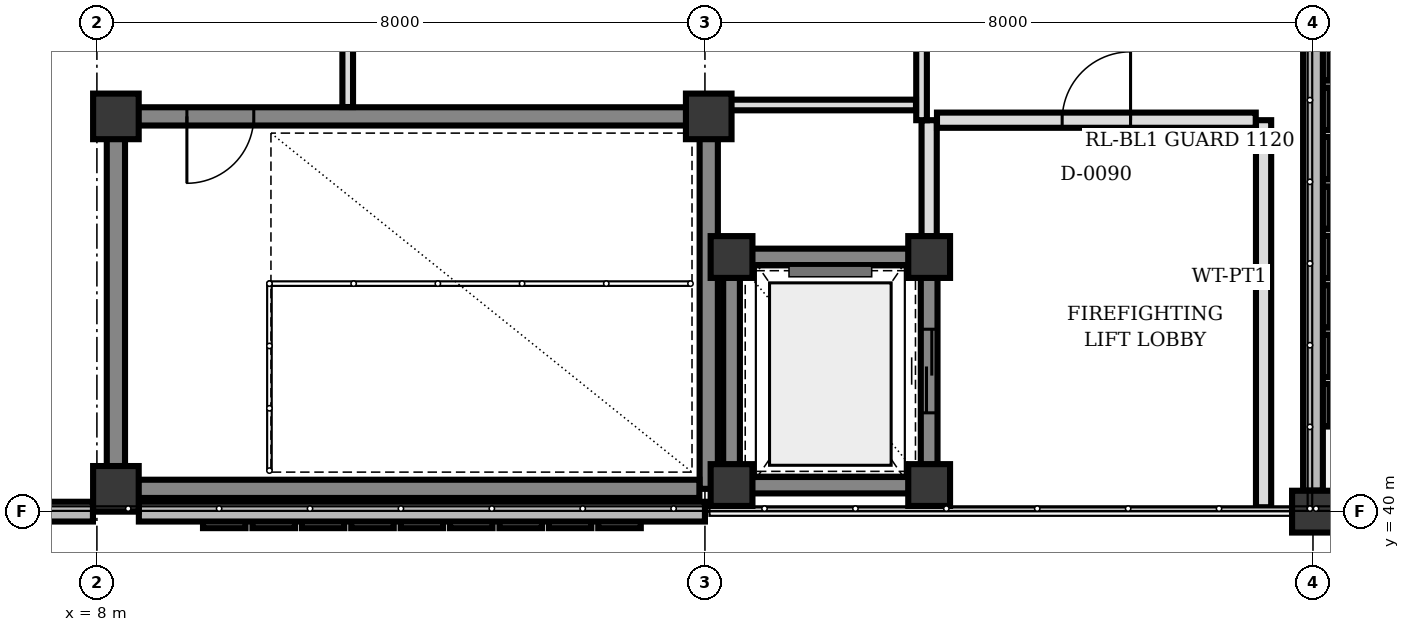
"""IFC4 building model, lengths in metres.
Left out: names, types, materials, properties, quantities, classifications, styles, units other than length and angle.
Written with IfcOpenShell. Run it as: python <this file> out.ifc"""

import sys

from ifc_helpers import new_model, si_unit, direction, frame, frame_2d, origin, origin_2d, place, context, subcontext, project, spatial, rectangle, extrude, element, fill, save


model = new_model("IFC4")
c1 = context("Model", 3, precision=1e-05, world=origin(), true_north=direction((0.0, 1.0)))
c2 = subcontext(c1, "Body", "Model", "MODEL_VIEW")
j1 = project(units=[si_unit("LENGTHUNIT", "METRE"), si_unit("PLANEANGLEUNIT", "RADIAN")], contexts=[c1])
p1 = place(None, origin())
s1 = spatial("IfcSite", under=j1, at=p1, CompositionType="ELEMENT")
p2 = place(p1, origin())
s2 = spatial("IfcBuilding", under=s1, at=p2, CompositionType="ELEMENT")
p3 = place(p2, frame((0.0, 0.0, 20.5)))
s3 = spatial("IfcBuildingStorey", under=s2, at=p3, CompositionType="ELEMENT", Elevation=20.5)
for number, where, z_axis, x_axis in (
    (1, (8.25, 40.3, 0.0), (0.0, 0.0, 1.0), (1.0, 0.0, 0.0)),
    (2, (16.05, 45.2, 0.0), (0.0, 0.0, 1.0), (1.0, 0.0, 0.0)),
    (3, (8.25, 45.2, 0.0), (0.0, 0.0, 1.0), (1.0, 0.0, 0.0)),
):
    element("IfcColumn", number, at=place(p3, frame(where, z_axis=z_axis, x_axis=x_axis)), inside=s3, PredefinedType="COLUMN", context=c2, shape_type="SweptSolid", body=[
        extrude(rectangle(XDim=0.6, YDim=0.6, at=origin_2d()), origin(), (0.0, 0.0, 1.0), 4.0),
    ])
for number, where, z_axis, x_axis in (
    (4, (16.35, 40.35, 0.0), (0.0, 0.0, 1.0), (1.0, 0.0, 0.0)),
    (5, (18.95, 40.35, 0.0), (0.0, 0.0, 1.0), (1.0, 0.0, 0.0)),
    (6, (18.95, 43.35, 0.0), (0.0, 0.0, 1.0), (1.0, 0.0, 0.0)),
    (7, (16.35, 43.35, 0.0), (0.0, 0.0, 1.0), (1.0, 0.0, 0.0)),
    (8, (24.0, 40.0, 0.0), (0.0, 0.0, 1.0), (1.0, 0.0, 0.0)),
):
    element("IfcColumn", number, at=place(p3, frame(where, z_axis=z_axis, x_axis=x_axis)), inside=s3, PredefinedType="COLUMN", context=c2, shape_type="SweptSolid", body=[
        extrude(rectangle(XDim=0.55, YDim=0.55, at=origin_2d()), origin(), (0.0, 0.0, 1.0), 4.0),
    ])
p4 = place(p3, frame((24.0, 47.723, 0.0), z_axis=(0.0, 0.0, 1.0), x_axis=(0.0, -1.0, 0.0)))
e9 = element("IfcWall", 9, at=p4, inside=s3, PredefinedType="SOLIDWALL", context=c2, shape_type="SweptSolid", body=[
    extrude(rectangle(XDim=7.446, YDim=0.26, at=frame_2d((3.723, 0.0))), origin(), (0.0, 0.0, 1.0), 3.397),
])
p5 = place(p3, frame((16.0, 40.0, 0.0), z_axis=(0.0, 0.0, 1.0), x_axis=(-1.0, 0.0, 0.0)))
e10 = element("IfcWall", 10, at=p5, inside=s3, PredefinedType="SOLIDWALL", context=c2, shape_type="SweptSolid", body=[
    extrude(rectangle(XDim=7.448, YDim=0.26, at=frame_2d((3.724, 0.0))), origin(), (0.0, 0.0, 1.0), 3.55),
])
p6 = place(p3, frame((7.948, 40.0, 0.0), z_axis=(0.0, 0.0, 1.0), x_axis=(-1.0, 0.0, 0.0)))
e11 = element("IfcWall", 11, at=p6, inside=s3, PredefinedType="SOLIDWALL", context=c2, shape_type="SweptSolid", body=[
    extrude(rectangle(XDim=7.671, YDim=0.26, at=frame_2d((3.835, 0.0))), origin(), (0.0, 0.0, 1.0), 3.55),
])
p7 = place(p6, frame((1.476, 0.0, 0.9)))
e12 = element("IfcOpeningElement", 12, at=p7, cuts=e11, PredefinedType="OPENING", context=c2, shape_type="SweptSolid", body=[
    extrude(rectangle(XDim=1.65, YDim=1.4, at=frame_2d((0.825, 0.7))), frame((0.0, 0.14, 0.0), z_axis=(0.0, -1.0, 0.0), x_axis=(1.0, 0.0, 0.0)), (0.0, 0.0, 1.0), 0.28),
])
p8 = place(p3, frame((8.25, 40.592, 0.0), z_axis=(0.0, 0.0, 1.0), x_axis=(0.0, 1.0, 0.0)))
e13 = element("IfcWall", 13, at=p8, inside=s3, PredefinedType="SHEAR", context=c2, shape_type="SweptSolid", body=[
    extrude(rectangle(XDim=4.316, YDim=0.24, at=frame_2d((2.158, 0.0))), origin(), (0.0, 0.0, 1.0), 3.74),
])
p9 = place(p3, frame((16.05, 44.908, 0.0), z_axis=(0.0, 0.0, 1.0), x_axis=(0.0, -1.0, 0.0)))
e14 = element("IfcWall", 14, at=p9, inside=s3, PredefinedType="SHEAR", context=c2, shape_type="SweptSolid", body=[
    extrude(rectangle(XDim=4.608, YDim=0.24, at=frame_2d((2.304, 0.0))), origin(), (0.0, 0.0, 1.0), 3.74),
])
p10 = place(p3, frame((15.927, 40.3, 0.0), z_axis=(0.0, 0.0, 1.0), x_axis=(-1.0, 0.0, 0.0)))
e15 = element("IfcWall", 15, at=p10, inside=s3, PredefinedType="SHEAR", context=c2, shape_type="SweptSolid", body=[
    extrude(rectangle(XDim=7.385, YDim=0.24, at=frame_2d((3.692, 0.0))), origin(), (0.0, 0.0, 1.0), 3.74),
])
p11 = place(p3, frame((15.758, 45.2, 0.0), z_axis=(0.0, 0.0, 1.0), x_axis=(-1.0, 0.0, 0.0)))
e16 = element("IfcWall", 16, at=p11, inside=s3, PredefinedType="SHEAR", context=c2, shape_type="SweptSolid", body=[
    extrude(rectangle(XDim=7.216, YDim=0.24, at=frame_2d((3.608, 0.0))), origin(), (0.0, 0.0, 1.0), 3.74),
])
p12 = place(p11, frame((5.694, 0.0, 0.0)))
e17 = element("IfcOpeningElement", 17, at=p12, cuts=e16, PredefinedType="OPENING", context=c2, shape_type="SweptSolid", body=[
    extrude(rectangle(XDim=0.88, YDim=2.1, at=frame_2d((0.44, 1.05))), frame((0.0, 0.13, 0.0), z_axis=(0.0, -1.0, 0.0), x_axis=(1.0, 0.0, 0.0)), (0.0, 0.0, 1.0), 0.26),
])
p13 = place(p3, frame((16.617, 40.35, 0.0), z_axis=(0.0, 0.0, 1.0), x_axis=(1.0, 0.0, 0.0)))
e18 = element("IfcWall", 18, at=p13, inside=s3, PredefinedType="SHEAR", context=c2, shape_type="SweptSolid", body=[
    extrude(rectangle(XDim=2.066, YDim=0.22, at=frame_2d((1.033, 0.0))), origin(), (0.0, 0.0, 1.0), 3.74),
])
p14 = place(p3, frame((18.95, 40.617, 0.0), z_axis=(0.0, 0.0, 1.0), x_axis=(0.0, 1.0, 0.0)))
e19 = element("IfcWall", 19, at=p14, inside=s3, PredefinedType="SHEAR", context=c2, shape_type="SweptSolid", body=[
    extrude(rectangle(XDim=2.466, YDim=0.22, at=frame_2d((1.233, 0.0))), origin(), (0.0, 0.0, 1.0), 3.74),
])
p15 = place(p14, frame((0.683, 0.0, 0.0)))
e20 = element("IfcOpeningElement", 20, at=p15, cuts=e19, PredefinedType="OPENING", context=c2, shape_type="SweptSolid", body=[
    extrude(rectangle(XDim=1.1, YDim=2.15, at=frame_2d((0.55, 1.075))), frame((0.0, 0.12, 0.0), z_axis=(0.0, -1.0, 0.0), x_axis=(1.0, 0.0, 0.0)), (0.0, 0.0, 1.0), 0.24),
])
p16 = place(p3, frame((18.683, 43.35, 0.0), z_axis=(0.0, 0.0, 1.0), x_axis=(-1.0, 0.0, 0.0)))
e21 = element("IfcWall", 21, at=p16, inside=s3, PredefinedType="SHEAR", context=c2, shape_type="SweptSolid", body=[
    extrude(rectangle(XDim=2.066, YDim=0.22, at=frame_2d((1.033, 0.0))), origin(), (0.0, 0.0, 1.0), 3.74),
])
p17 = place(p3, frame((16.35, 43.083, 0.0), z_axis=(0.0, 0.0, 1.0), x_axis=(0.0, -1.0, 0.0)))
e22 = element("IfcWall", 22, at=p17, inside=s3, PredefinedType="SHEAR", context=c2, shape_type="SweptSolid", body=[
    extrude(rectangle(XDim=2.466, YDim=0.22, at=frame_2d((1.233, 0.0))), origin(), (0.0, 0.0, 1.0), 3.74),
])
p18 = place(p3, frame((18.95, 43.617, 0.0), z_axis=(0.0, 0.0, 1.0), x_axis=(0.0, 1.0, 0.0)))
e23 = element("IfcWall", 23, at=p18, inside=s3, PredefinedType="PARTITIONING", context=c2, shape_type="SweptSolid", body=[
    extrude(rectangle(XDim=1.533, YDim=0.2, at=frame_2d((0.767, 0.0))), origin(), (0.0, 0.0, 1.0), 3.7),
])
p19 = place(p3, frame((23.35, 40.058, 0.0), z_axis=(0.0, 0.0, 1.0), x_axis=(0.0, 1.0, 0.0)))
e24 = element("IfcWall", 24, at=p19, inside=s3, PredefinedType="PARTITIONING", context=c2, shape_type="SweptSolid", body=[
    extrude(rectangle(XDim=5.092, YDim=0.2, at=frame_2d((2.546, 0.0))), origin(), (0.0, 0.0, 1.0), 3.7),
])
p20 = place(p3, frame((19.053, 45.15, 0.0), z_axis=(0.0, 0.0, 1.0), x_axis=(1.0, 0.0, 0.0)))
e25 = element("IfcWall", 25, at=p20, inside=s3, PredefinedType="PARTITIONING", context=c2, shape_type="SweptSolid", body=[
    extrude(rectangle(XDim=4.194, YDim=0.2, at=frame_2d((2.097, 0.0))), origin(), (0.0, 0.0, 1.0), 3.7),
])
p21 = place(p20, frame((1.647, 0.0, 0.0)))
e26 = element("IfcOpeningElement", 26, at=p21, cuts=e25, PredefinedType="OPENING", context=c2, shape_type="SweptSolid", body=[
    extrude(rectangle(XDim=0.9, YDim=2.2, at=frame_2d((0.45, 1.1))), frame((0.0, 0.11, 0.0), z_axis=(0.0, -1.0, 0.0), x_axis=(1.0, 0.0, 0.0)), (0.0, 0.0, 1.0), 0.22),
])
p22 = place(p3, frame((18.85, 47.827, 0.0), z_axis=(0.0, 0.0, 1.0), x_axis=(0.0, -1.0, 0.0)))
e27 = element("IfcWall", 27, at=p22, inside=s3, PredefinedType="PARTITIONING", context=c2, shape_type="SweptSolid", body=[
    extrude(rectangle(XDim=2.677, YDim=0.14, at=frame_2d((1.338, 0.0))), origin(), (0.0, 0.0, 1.0), 3.14),
])
p23 = place(p3, frame((11.3, 45.323, 0.0), z_axis=(0.0, 0.0, 1.0), x_axis=(0.0, 1.0, 0.0)))
e28 = element("IfcWall", 28, at=p23, inside=s3, PredefinedType="PARTITIONING", context=c2, shape_type="SweptSolid", body=[
    extrude(rectangle(XDim=2.504, YDim=0.14, at=frame_2d((1.252, 0.0))), origin(), (0.0, 0.0, 1.0), 3.14),
])
p24 = place(p3, frame((18.777, 45.35, 0.0), z_axis=(0.0, 0.0, 1.0), x_axis=(-1.0, 0.0, 0.0)))
e29 = element("IfcWall", 29, at=p24, inside=s3, PredefinedType="PARTITIONING", context=c2, shape_type="SweptSolid", body=[
    extrude(rectangle(XDim=2.435, YDim=0.14, at=frame_2d((1.218, 0.0))), origin(), (0.0, 0.0, 1.0), 3.7),
])
p25 = place(p12, origin())
e30 = element("IfcDoor", 30, at=p25, inside=s3, OperationType="SINGLE_SWING_RIGHT", PredefinedType="DOOR", context=c2, shape_type="SweptSolid", body=[
    extrude(rectangle(XDim=0.88, YDim=2.1, at=frame_2d((0.44, 1.05))), frame((0.0, 0.025, 0.0), z_axis=(0.0, -1.0, 0.0), x_axis=(1.0, 0.0, 0.0)), (0.0, 0.0, 1.0), 0.05),
])
fill(e17, e30)
p26 = place(p15, origin())
e31 = element("IfcDoor", 31, at=p26, inside=s3, OperationType="DOUBLE_DOOR_SLIDING", PredefinedType="DOOR", context=c2, shape_type="SweptSolid", body=[
    extrude(rectangle(XDim=1.1, YDim=2.15, at=frame_2d((0.55, 1.075))), frame((0.0, 0.025, 0.0), z_axis=(0.0, -1.0, 0.0), x_axis=(1.0, 0.0, 0.0)), (0.0, 0.0, 1.0), 0.05),
])
fill(e20, e31)
p27 = place(p21, origin())
e32 = element("IfcDoor", 32, at=p27, inside=s3, OperationType="SINGLE_SWING_RIGHT", PredefinedType="DOOR", context=c2, shape_type="SweptSolid", body=[
    extrude(rectangle(XDim=0.9, YDim=2.2, at=frame_2d((0.45, 1.1))), frame((0.0, 0.025, 0.0), z_axis=(0.0, -1.0, 0.0), x_axis=(1.0, 0.0, 0.0)), (0.0, 0.0, 1.0), 0.05),
])
fill(e26, e32)
save(model, sys.argv[1])
